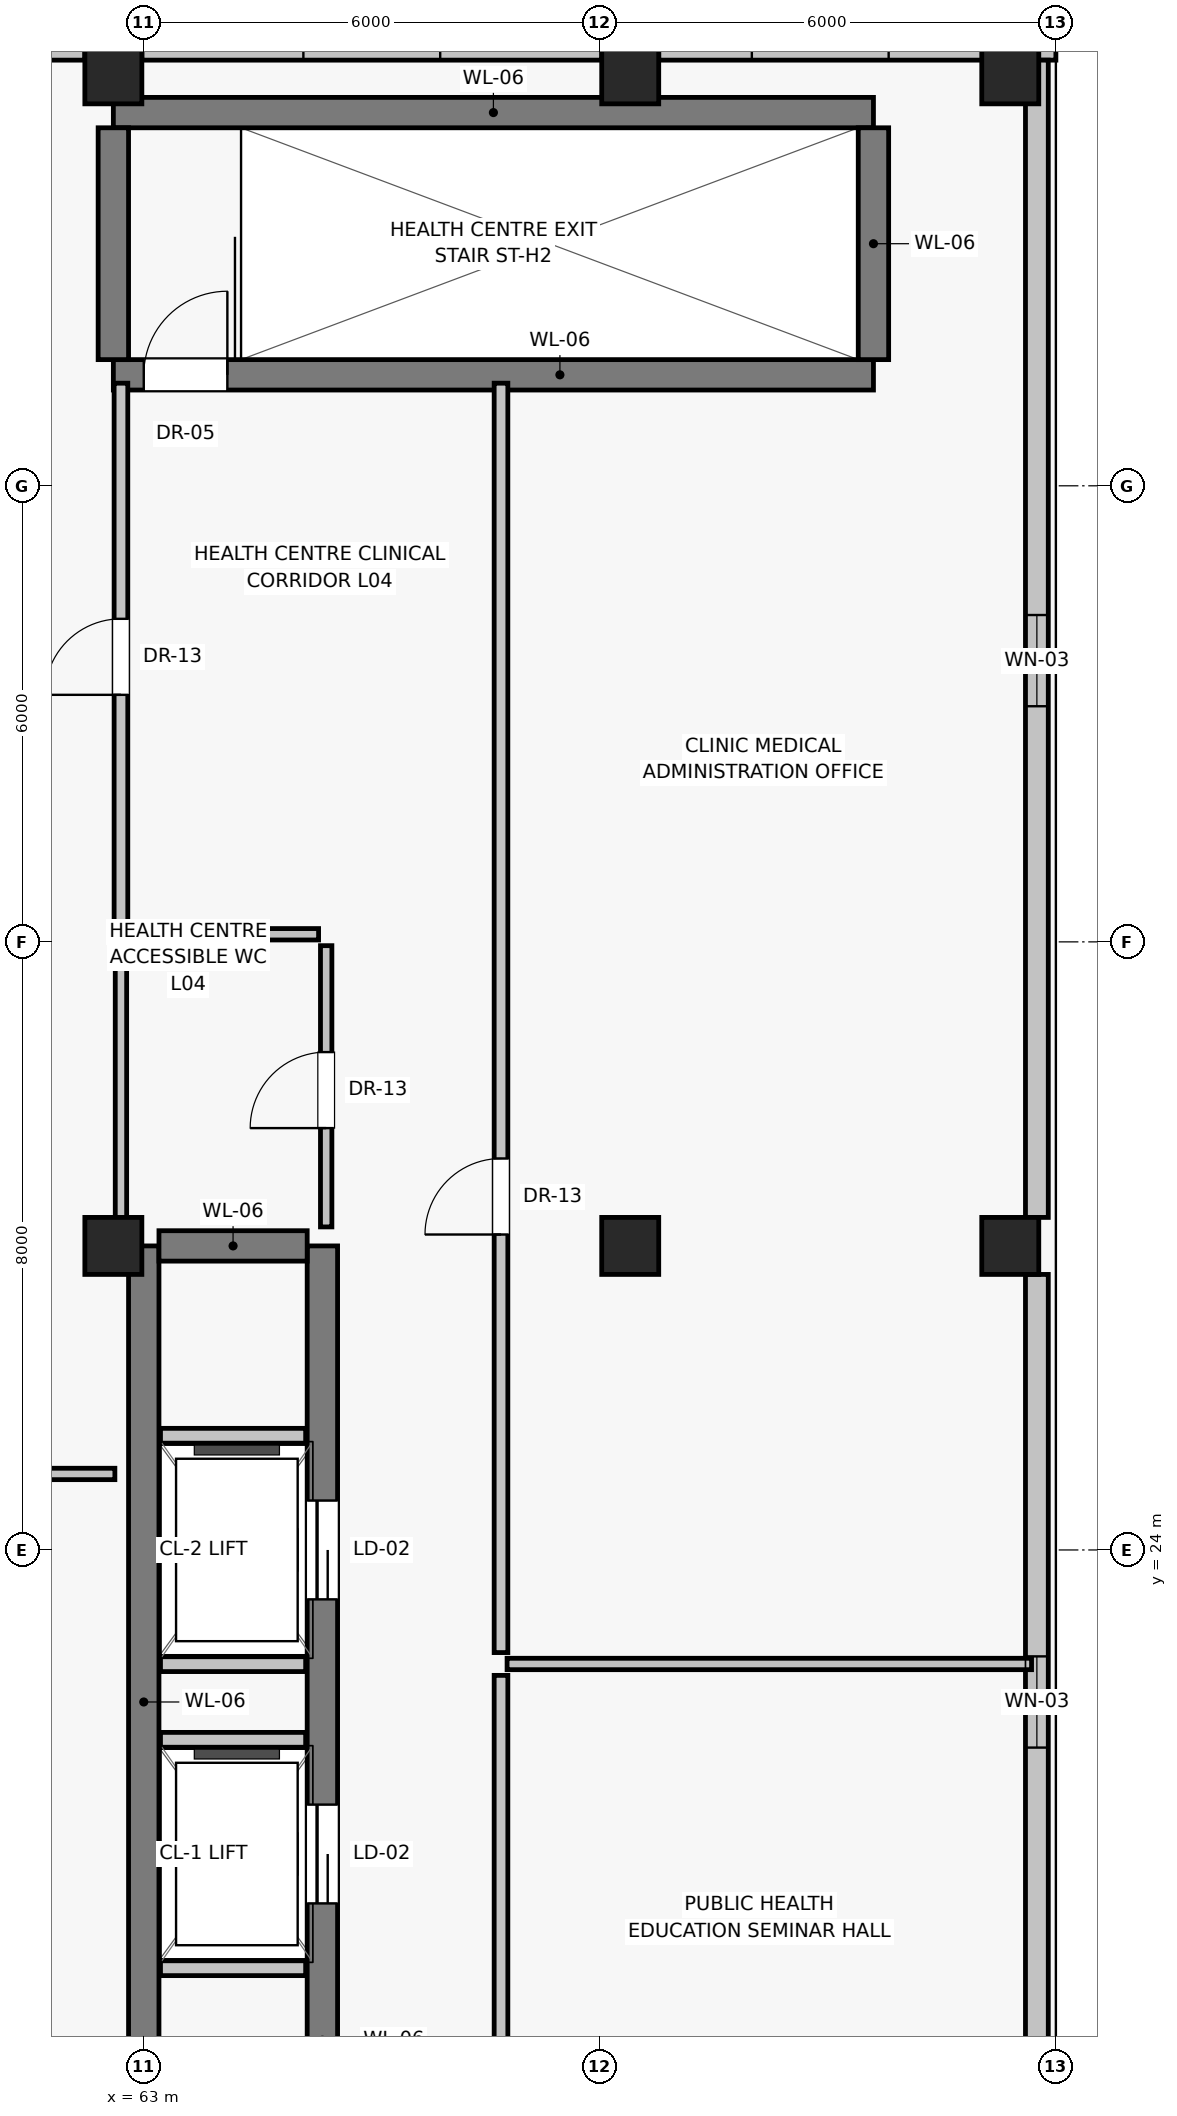
"""IFC4 building model, lengths in metres.
Left out: names, types, materials, properties, quantities, classifications, styles, units other than length and angle.
Written with IfcOpenShell. Run it as: python <this file> out.ifc"""

import sys

from ifc_helpers import new_model, si_unit, direction, frame, frame_2d, origin, origin_2d, place, context, subcontext, project, spatial, rectangle, extrude, source, transform, mapped, element, fill, save


model = new_model("IFC4")
c1 = context("Model", 3, precision=1e-05, world=origin(), true_north=direction((0.0, 1.0)))
c2 = subcontext(c1, "Body", "Model", "MODEL_VIEW")
j1 = project(units=[si_unit("LENGTHUNIT", "METRE"), si_unit("PLANEANGLEUNIT", "RADIAN")], contexts=[c1])
p1 = place(None, origin())
s1 = spatial("IfcSite", under=j1, at=p1, CompositionType="ELEMENT")
p2 = place(p1, origin())
s2 = spatial("IfcBuilding", under=s1, at=p2, CompositionType="ELEMENT")
p3 = place(p2, frame((0.0, 0.0, 18.4)))
s3 = spatial("IfcBuildingStorey", under=s2, at=p3, CompositionType="ELEMENT", Elevation=18.4)
for number, where, z_axis, x_axis in (
    (1, (62.6, 28.0, 0.0), (0.0, 0.0, 1.0), (1.0, 0.0, 0.0)),
    (2, (62.6, 43.4, 0.0), (0.0, 0.0, 1.0), (1.0, 0.0, 0.0)),
    (3, (69.4, 28.0, 0.0), (0.0, 0.0, 1.0), (1.0, 0.0, 0.0)),
    (4, (69.4, 43.4, 0.0), (0.0, 0.0, 1.0), (1.0, 0.0, 0.0)),
    (5, (74.4, 28.0, 0.0), (0.0, 0.0, 1.0), (1.0, 0.0, 0.0)),
    (6, (74.4, 43.4, 0.0), (0.0, 0.0, 1.0), (1.0, 0.0, 0.0)),
):
    element("IfcColumn", number, at=place(p3, frame(where, z_axis=z_axis, x_axis=x_axis)), inside=s3, PredefinedType="COLUMN", context=c2, shape_type="SweptSolid", body=[
        extrude(rectangle(XDim=0.75, YDim=0.75, at=origin_2d()), origin(), (0.0, 0.0, 1.0), 4.4),
    ])
p4 = place(p3, frame((75.0, 43.75, 0.0), z_axis=(0.0, 0.0, 1.0), x_axis=(-1.0, 0.0, 0.0)))
e7 = element("IfcWall", 7, at=p4, inside=s3, PredefinedType="SOLIDWALL", context=c2, shape_type="SweptSolid", body=[
    extrude(rectangle(XDim=5.225, YDim=0.3, at=frame_2d((2.613, 0.0))), origin(), (0.0, 0.0, 1.0), 3.39),
])
p5 = place(p4, frame((2.2, 0.0, 0.85)))
e8 = element("IfcOpeningElement", 8, at=p5, cuts=e7, PredefinedType="OPENING", context=c2, shape_type="SweptSolid", body=[
    extrude(rectangle(XDim=1.8, YDim=1.65, at=frame_2d((0.9, 0.825))), frame((0.0, 0.16, 0.0), z_axis=(0.0, -1.0, 0.0), x_axis=(1.0, 0.0, 0.0)), (0.0, 0.0, 1.0), 0.32),
])
p6 = place(p3, frame((69.025, 43.75, 0.0), z_axis=(0.0, 0.0, 1.0), x_axis=(-1.0, 0.0, 0.0)))
e9 = element("IfcWall", 9, at=p6, inside=s3, PredefinedType="SOLIDWALL", context=c2, shape_type="SweptSolid", body=[
    extrude(rectangle(XDim=6.05, YDim=0.3, at=frame_2d((3.025, 0.0))), origin(), (0.0, 0.0, 1.0), 3.39),
])
p7 = place(p6, frame((2.125, 0.0, 0.85)))
e10 = element("IfcOpeningElement", 10, at=p7, cuts=e9, PredefinedType="OPENING", context=c2, shape_type="SweptSolid", body=[
    extrude(rectangle(XDim=1.8, YDim=1.65, at=frame_2d((0.9, 0.825))), frame((0.0, 0.16, 0.0), z_axis=(0.0, -1.0, 0.0), x_axis=(1.0, 0.0, 0.0)), (0.0, 0.0, 1.0), 0.32),
])
p8 = place(p3, frame((62.225, 43.75, 0.0), z_axis=(0.0, 0.0, 1.0), x_axis=(-1.0, 0.0, 0.0)))
e11 = element("IfcWall", 11, at=p8, inside=s3, PredefinedType="SOLIDWALL", context=c2, shape_type="SweptSolid", body=[
    extrude(rectangle(XDim=5.225, YDim=0.3, at=frame_2d((2.613, 0.0))), origin(), (0.0, 0.0, 1.0), 3.39),
])
p9 = place(p8, frame((1.225, 0.0, 0.85)))
e12 = element("IfcOpeningElement", 12, at=p9, cuts=e11, PredefinedType="OPENING", context=c2, shape_type="SweptSolid", body=[
    extrude(rectangle(XDim=1.8, YDim=1.65, at=frame_2d((0.9, 0.825))), frame((0.0, 0.16, 0.0), z_axis=(0.0, -1.0, 0.0), x_axis=(1.0, 0.0, 0.0)), (0.0, 0.0, 1.0), 0.32),
])
p10 = place(p3, frame((74.75, 16.375, 0.0), z_axis=(0.0, 0.0, 1.0), x_axis=(0.0, 1.0, 0.0)))
e13 = element("IfcWall", 13, at=p10, inside=s3, PredefinedType="SOLIDWALL", context=c2, shape_type="SweptSolid", body=[
    extrude(rectangle(XDim=11.25, YDim=0.3, at=frame_2d((5.625, 0.0))), origin(), (0.0, 0.0, 1.0), 3.39),
])
p11 = place(p10, frame((5.025, 0.0, 0.95)))
e14 = element("IfcOpeningElement", 14, at=p11, cuts=e13, PredefinedType="OPENING", context=c2, shape_type="SweptSolid", body=[
    extrude(rectangle(XDim=1.2, YDim=1.5, at=frame_2d((0.6, 0.75))), frame((0.0, 0.16, 0.0), z_axis=(0.0, -1.0, 0.0), x_axis=(1.0, 0.0, 0.0)), (0.0, 0.0, 1.0), 0.32),
])
p12 = place(p3, frame((74.75, 28.375, 0.0), z_axis=(0.0, 0.0, 1.0), x_axis=(0.0, 1.0, 0.0)))
e15 = element("IfcWall", 15, at=p12, inside=s3, PredefinedType="SOLIDWALL", context=c2, shape_type="SweptSolid", body=[
    extrude(rectangle(XDim=15.225, YDim=0.3, at=frame_2d((7.613, 0.0))), origin(), (0.0, 0.0, 1.0), 3.39),
])
p13 = place(p12, frame((6.725, 0.0, 0.95)))
e16 = element("IfcOpeningElement", 16, at=p13, cuts=e15, PredefinedType="OPENING", context=c2, shape_type="SweptSolid", body=[
    extrude(rectangle(XDim=1.2, YDim=1.5, at=frame_2d((0.6, 0.75))), frame((0.0, 0.16, 0.0), z_axis=(0.0, -1.0, 0.0), x_axis=(1.0, 0.0, 0.0)), (0.0, 0.0, 1.0), 0.32),
])
p14 = place(p3, frame((63.0, 16.0, 0.0), z_axis=(0.0, 0.0, 1.0), x_axis=(0.0, 1.0, 0.0)))
e17 = element("IfcWall", 17, at=p14, inside=s3, PredefinedType="SHEAR", context=c2, shape_type="SweptSolid", body=[
    extrude(rectangle(XDim=12.0, YDim=0.4, at=frame_2d((6.0, 0.0))), origin(), (0.0, 0.0, 1.0), 4.14),
])
p15 = place(p3, frame((65.35, 16.0, 0.0), z_axis=(0.0, 0.0, 1.0), x_axis=(0.0, 1.0, 0.0)))
e18 = element("IfcWall", 18, at=p15, inside=s3, PredefinedType="SHEAR", context=c2, shape_type="SweptSolid", body=[
    extrude(rectangle(XDim=12.0, YDim=0.4, at=frame_2d((6.0, 0.0))), origin(), (0.0, 0.0, 1.0), 4.14),
])
p16 = place(p15, frame((3.35, 0.0, 0.0)))
e19 = element("IfcOpeningElement", 19, at=p16, cuts=e18, PredefinedType="OPENING", context=c2, shape_type="SweptSolid", body=[
    extrude(rectangle(XDim=1.3, YDim=2.25, at=frame_2d((0.65, 1.125))), frame((0.0, 0.21, 0.0), z_axis=(0.0, -1.0, 0.0), x_axis=(1.0, 0.0, 0.0)), (0.0, 0.0, 1.0), 0.42),
])
p17 = place(p15, frame((7.35, 0.0, 0.0)))
e20 = element("IfcOpeningElement", 20, at=p17, cuts=e18, PredefinedType="OPENING", context=c2, shape_type="SweptSolid", body=[
    extrude(rectangle(XDim=1.3, YDim=2.25, at=frame_2d((0.65, 1.125))), frame((0.0, 0.21, 0.0), z_axis=(0.0, -1.0, 0.0), x_axis=(1.0, 0.0, 0.0)), (0.0, 0.0, 1.0), 0.42),
])
p18 = place(p3, frame((63.2, 28.0, 0.0), z_axis=(0.0, 0.0, 1.0), x_axis=(1.0, 0.0, 0.0)))
e21 = element("IfcWall", 21, at=p18, inside=s3, PredefinedType="SHEAR", context=c2, shape_type="SweptSolid", body=[
    extrude(rectangle(XDim=1.95, YDim=0.4, at=frame_2d((0.975, 0.0))), origin(), (0.0, 0.0, 1.0), 4.14),
])
for number, where, z_axis, x_axis in (
    (22, (63.22, 18.5, 0.0), (0.0, 0.0, 1.0), (1.0, 0.0, 0.0)),
    (23, (63.22, 21.5, 0.0), (0.0, 0.0, 1.0), (1.0, 0.0, 0.0)),
    (24, (63.22, 22.5, 0.0), (0.0, 0.0, 1.0), (1.0, 0.0, 0.0)),
    (25, (63.22, 25.5, 0.0), (0.0, 0.0, 1.0), (1.0, 0.0, 0.0)),
):
    element("IfcWall", number, at=place(p3, frame(where, z_axis=z_axis, x_axis=x_axis)), inside=s3, PredefinedType="SOLIDWALL", context=c2, shape_type="SweptSolid", body=[
        extrude(rectangle(XDim=1.91, YDim=0.2, at=frame_2d((0.955, 0.0))), origin(), (0.0, 0.0, 1.0), 4.14),
    ])
p19 = place(p3, frame((62.6, 39.46, 0.0), z_axis=(0.0, 0.0, 1.0), x_axis=(1.0, 0.0, 0.0)))
e26 = element("IfcWall", 26, at=p19, inside=s3, PredefinedType="SHEAR", context=c2, shape_type="SweptSolid", body=[
    extrude(rectangle(XDim=10.0, YDim=0.4, at=frame_2d((5.0, 0.0))), origin(), (0.0, 0.0, 1.0), 4.14),
])
p20 = place(p19, frame((0.4, 0.0, 0.0)))
e27 = element("IfcOpeningElement", 27, at=p20, cuts=e26, PredefinedType="OPENING", context=c2, shape_type="SweptSolid", body=[
    extrude(rectangle(XDim=1.1, YDim=2.03, at=frame_2d((0.55, 1.015))), frame((0.0, 0.21, 0.0), z_axis=(0.0, -1.0, 0.0), x_axis=(1.0, 0.0, 0.0)), (0.0, 0.0, 1.0), 0.42),
])
p21 = place(p3, frame((62.6, 42.91, 0.0), z_axis=(0.0, 0.0, 1.0), x_axis=(1.0, 0.0, 0.0)))
e28 = element("IfcWall", 28, at=p21, inside=s3, PredefinedType="SHEAR", context=c2, shape_type="SweptSolid", body=[
    extrude(rectangle(XDim=10.0, YDim=0.4, at=frame_2d((5.0, 0.0))), origin(), (0.0, 0.0, 1.0), 4.14),
])
for number, where, z_axis, x_axis in (
    (29, (62.6, 39.66, 0.0), (0.0, 0.0, 1.0), (0.0, 1.0, 0.0)),
    (30, (72.6, 39.66, 0.0), (0.0, 0.0, 1.0), (0.0, 1.0, 0.0)),
):
    element("IfcWall", number, at=place(p3, frame(where, z_axis=z_axis, x_axis=x_axis)), inside=s3, PredefinedType="SHEAR", context=c2, shape_type="SweptSolid", body=[
        extrude(rectangle(XDim=3.05, YDim=0.4, at=frame_2d((1.525, 0.0))), origin(), (0.0, 0.0, 1.0), 4.14),
    ])
p22 = place(p3, frame((62.8, 32.1, 0.0), z_axis=(0.0, 0.0, 1.0), x_axis=(1.0, 0.0, 0.0)))
e31 = element("IfcWall", 31, at=p22, inside=s3, PredefinedType="PARTITIONING", context=c2, shape_type="SweptSolid", body=[
    extrude(rectangle(XDim=2.5, YDim=0.15, at=frame_2d((1.25, 0.0))), origin(), (0.0, 0.0, 1.0), 4.14),
])
p23 = place(p3, frame((62.7, 28.2, 0.0), z_axis=(0.0, 0.0, 1.0), x_axis=(0.0, 1.0, 0.0)))
e32 = element("IfcWall", 32, at=p23, inside=s3, PredefinedType="PARTITIONING", context=c2, shape_type="SweptSolid", body=[
    extrude(rectangle(XDim=3.8, YDim=0.15, at=frame_2d((1.9, 0.0))), origin(), (0.0, 0.0, 1.0), 3.54),
])
p24 = place(p3, frame((65.4, 28.25, 0.0), z_axis=(0.0, 0.0, 1.0), x_axis=(0.0, 1.0, 0.0)))
e33 = element("IfcWall", 33, at=p24, inside=s3, PredefinedType="PARTITIONING", context=c2, shape_type="SweptSolid", body=[
    extrude(rectangle(XDim=3.7, YDim=0.15, at=frame_2d((1.85, 0.0))), origin(), (0.0, 0.0, 1.0), 4.14),
])
p25 = place(p24, frame((1.3, 0.0, 0.0)))
e34 = element("IfcOpeningElement", 34, at=p25, cuts=e33, PredefinedType="OPENING", context=c2, shape_type="SweptSolid", body=[
    extrude(rectangle(XDim=1.0, YDim=2.01, at=frame_2d((0.5, 1.005))), frame((0.0, 0.085, 0.0), z_axis=(0.0, -1.0, 0.0), x_axis=(1.0, 0.0, 0.0)), (0.0, 0.0, 1.0), 0.17),
])
p26 = place(p3, frame((62.7, 32.25, 0.0), z_axis=(0.0, 0.0, 1.0), x_axis=(0.0, 1.0, 0.0)))
e35 = element("IfcWall", 35, at=p26, inside=s3, PredefinedType="PARTITIONING", context=c2, shape_type="SweptSolid", body=[
    extrude(rectangle(XDim=7.1, YDim=0.18, at=frame_2d((3.55, 0.0))), origin(), (0.0, 0.0, 1.0), 3.54),
])
p27 = place(p26, frame((3.0, 0.0, 0.0)))
e36 = element("IfcOpeningElement", 36, at=p27, cuts=e35, PredefinedType="OPENING", context=c2, shape_type="SweptSolid", body=[
    extrude(rectangle(XDim=1.0, YDim=2.01, at=frame_2d((0.5, 1.005))), frame((0.0, 0.1, 0.0), z_axis=(0.0, -1.0, 0.0), x_axis=(1.0, 0.0, 0.0)), (0.0, 0.0, 1.0), 0.2),
])
p28 = place(p3, frame((57.32, 25.0, 0.0), z_axis=(0.0, 0.0, 1.0), x_axis=(1.0, 0.0, 0.0)))
e37 = element("IfcWall", 37, at=p28, inside=s3, PredefinedType="PARTITIONING", context=c2, shape_type="SweptSolid", body=[
    extrude(rectangle(XDim=5.3, YDim=0.15, at=frame_2d((2.65, 0.0))), origin(), (0.0, 0.0, 1.0), 4.14),
])
p29 = place(p3, frame((67.7, 8.65, 0.0), z_axis=(0.0, 0.0, 1.0), x_axis=(0.0, 1.0, 0.0)))
e38 = element("IfcWall", 38, at=p29, inside=s3, PredefinedType="PARTITIONING", context=c2, shape_type="SweptSolid", body=[
    extrude(rectangle(XDim=13.7, YDim=0.18, at=frame_2d((6.85, 0.0))), origin(), (0.0, 0.0, 1.0), 4.14),
])
p30 = place(p29, frame((5.5, 0.0, 0.0)))
e39 = element("IfcOpeningElement", 39, at=p30, cuts=e38, PredefinedType="OPENING", context=c2, shape_type="SweptSolid", body=[
    extrude(rectangle(XDim=1.0, YDim=2.01, at=frame_2d((0.5, 1.005))), frame((0.0, 0.1, 0.0), z_axis=(0.0, -1.0, 0.0), x_axis=(1.0, 0.0, 0.0)), (0.0, 0.0, 1.0), 0.2),
])
p31 = place(p3, frame((67.7, 22.65, 0.0), z_axis=(0.0, 0.0, 1.0), x_axis=(0.0, 1.0, 0.0)))
e40 = element("IfcWall", 40, at=p31, inside=s3, PredefinedType="PARTITIONING", context=c2, shape_type="SweptSolid", body=[
    extrude(rectangle(XDim=16.7, YDim=0.18, at=frame_2d((8.35, 0.0))), origin(), (0.0, 0.0, 1.0), 4.14),
])
p32 = place(p31, frame((5.5, 0.0, 0.0)))
e41 = element("IfcOpeningElement", 41, at=p32, cuts=e40, PredefinedType="OPENING", context=c2, shape_type="SweptSolid", body=[
    extrude(rectangle(XDim=1.0, YDim=2.01, at=frame_2d((0.5, 1.005))), frame((0.0, 0.1, 0.0), z_axis=(0.0, -1.0, 0.0), x_axis=(1.0, 0.0, 0.0)), (0.0, 0.0, 1.0), 0.2),
])
p33 = place(p3, frame((67.78, 22.5, 0.0), z_axis=(0.0, 0.0, 1.0), x_axis=(1.0, 0.0, 0.0)))
e42 = element("IfcWall", 42, at=p33, inside=s3, PredefinedType="PARTITIONING", context=c2, shape_type="SweptSolid", body=[
    extrude(rectangle(XDim=6.9, YDim=0.15, at=frame_2d((3.45, 0.0))), origin(), (0.0, 0.0, 1.0), 4.14),
])
m1 = source(origin(), c2, "Body", "SweptSolid", [
    extrude(rectangle(XDim=1.2, YDim=1.5, at=frame_2d((0.6, 0.75))), frame((0.0, 0.03, 0.0), z_axis=(0.0, -1.0, 0.0), x_axis=(1.0, 0.0, 0.0)), (0.0, 0.0, 1.0), 0.06),
])
p34 = place(p11, origin())
e43 = element("IfcWindow", 43, at=p34, inside=s3, PartitioningType="SINGLE_PANEL", PredefinedType="WINDOW", context=c2, shape_type="MappedRepresentation", body=[
    mapped(m1, transform((0.0, 0.0, 0.0), scale=1.0)),
])
fill(e14, e43)
p35 = place(p13, origin())
e44 = element("IfcWindow", 44, at=p35, inside=s3, PartitioningType="SINGLE_PANEL", PredefinedType="WINDOW", context=c2, shape_type="MappedRepresentation", body=[
    mapped(m1, transform((0.0, 0.0, 0.0), scale=1.0)),
])
fill(e16, e44)
m2 = source(origin(), c2, "Body", "SweptSolid", [
    extrude(rectangle(XDim=1.3, YDim=2.25, at=frame_2d((0.65, 1.125))), frame((0.0, 0.025, 0.0), z_axis=(0.0, -1.0, 0.0), x_axis=(1.0, 0.0, 0.0)), (0.0, 0.0, 1.0), 0.05),
])
p36 = place(p16, origin())
e45 = element("IfcDoor", 45, at=p36, inside=s3, OperationType="SLIDING_TO_LEFT", PredefinedType="DOOR", context=c2, shape_type="MappedRepresentation", body=[
    mapped(m2, transform((0.0, 0.0, 0.0), scale=1.0)),
])
fill(e19, e45)
p37 = place(p17, origin())
e46 = element("IfcDoor", 46, at=p37, inside=s3, OperationType="SLIDING_TO_LEFT", PredefinedType="DOOR", context=c2, shape_type="MappedRepresentation", body=[
    mapped(m2, transform((0.0, 0.0, 0.0), scale=1.0)),
])
fill(e20, e46)
m3 = source(origin(), c2, "Body", "SweptSolid", [
    extrude(rectangle(XDim=1.1, YDim=2.03, at=frame_2d((0.55, 1.015))), frame((0.0, 0.025, 0.0), z_axis=(0.0, -1.0, 0.0), x_axis=(1.0, 0.0, 0.0)), (0.0, 0.0, 1.0), 0.05),
])
p38 = place(p20, origin())
e47 = element("IfcDoor", 47, at=p38, inside=s3, OperationType="SINGLE_SWING_RIGHT", PredefinedType="DOOR", context=c2, shape_type="MappedRepresentation", body=[
    mapped(m3, transform((0.0, 0.0, 0.0), scale=1.0)),
])
fill(e27, e47)
m4 = source(origin(), c2, "Body", "SweptSolid", [
    extrude(rectangle(XDim=1.0, YDim=2.01, at=frame_2d((0.5, 1.005))), frame((0.0, 0.025, 0.0), z_axis=(0.0, -1.0, 0.0), x_axis=(1.0, 0.0, 0.0)), (0.0, 0.0, 1.0), 0.05),
])
p39 = place(p25, origin())
e48 = element("IfcDoor", 48, at=p39, inside=s3, OperationType="SINGLE_SWING_LEFT", PredefinedType="DOOR", context=c2, shape_type="MappedRepresentation", body=[
    mapped(m4, transform((0.0, 0.0, 0.0), scale=1.0)),
])
fill(e34, e48)
p40 = place(p27, origin())
e49 = element("IfcDoor", 49, at=p40, inside=s3, OperationType="SINGLE_SWING_LEFT", PredefinedType="DOOR", context=c2, shape_type="MappedRepresentation", body=[
    mapped(m4, transform((0.0, 0.0, 0.0), scale=1.0)),
])
fill(e36, e49)
p41 = place(p32, origin())
e50 = element("IfcDoor", 50, at=p41, inside=s3, OperationType="SINGLE_SWING_LEFT", PredefinedType="DOOR", context=c2, shape_type="MappedRepresentation", body=[
    mapped(m4, transform((0.0, 0.0, 0.0), scale=1.0)),
])
fill(e41, e50)
save(model, sys.argv[1])
